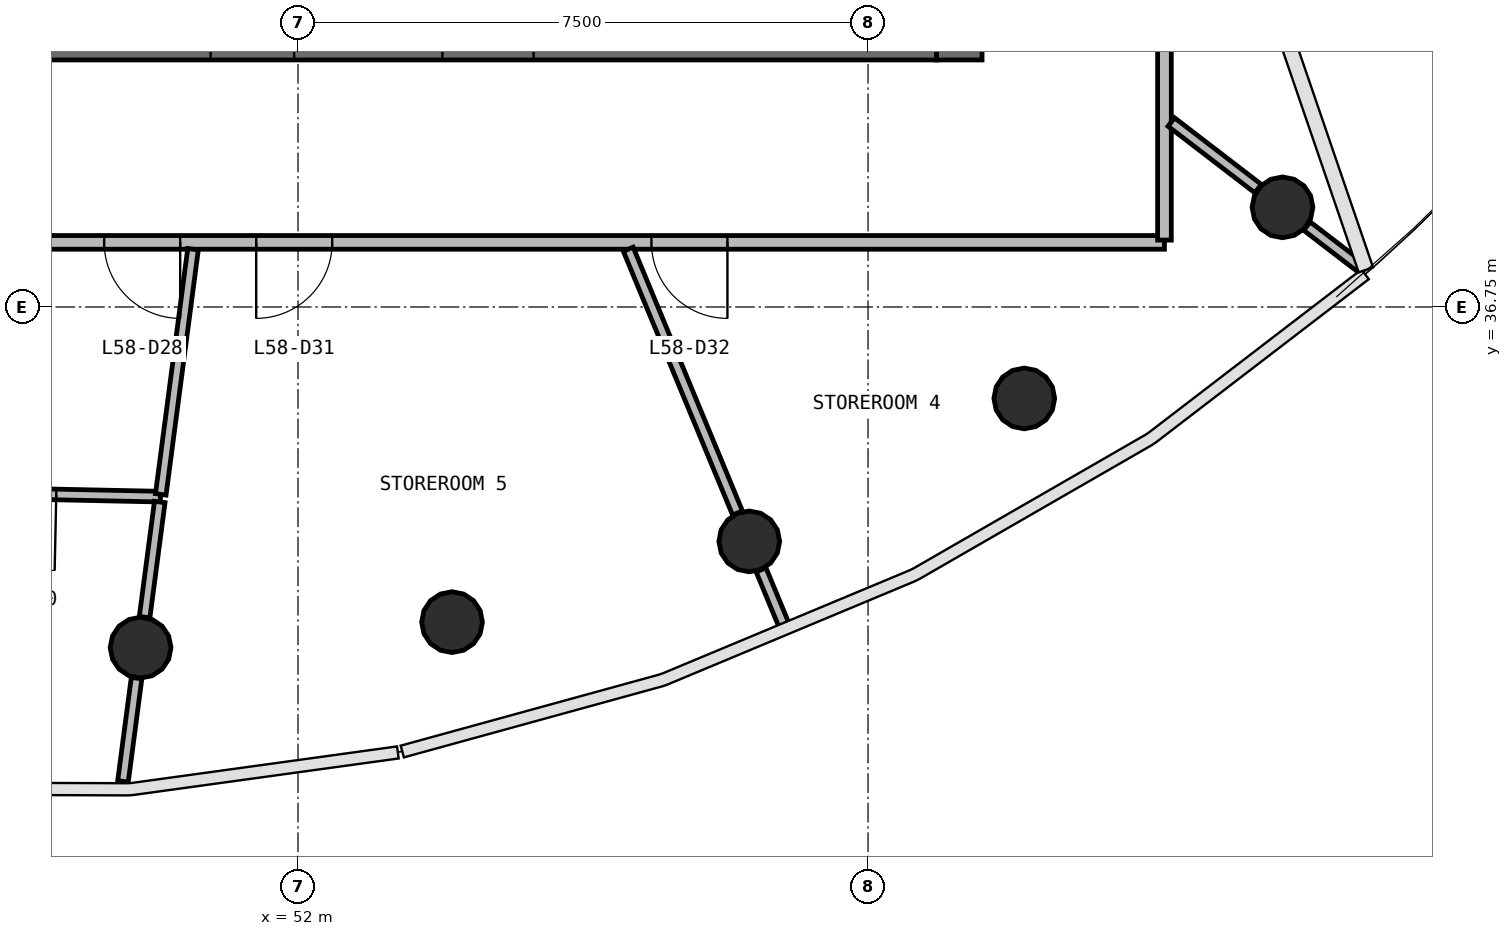
"""IFC4 building model, lengths in metres.
Left out: names, types, materials, properties, quantities, classifications, styles, units other than length and angle.
Written with IfcOpenShell. Run it as: python <this file> out.ifc"""

import sys

from ifc_helpers import new_model, si_unit, direction, frame, frame_2d, origin, origin_2d, place, context, subcontext, project, spatial, rectangle, circle, extrude, source, transform, mapped, element, fill, save


model = new_model("IFC4")
c1 = context("Model", 3, precision=1e-05, world=origin(), true_north=direction((0.0, 1.0)))
c2 = subcontext(c1, "Body", "Model", "MODEL_VIEW")
j1 = project(units=[si_unit("LENGTHUNIT", "METRE"), si_unit("PLANEANGLEUNIT", "RADIAN")], contexts=[c1])
p1 = place(None, origin())
s1 = spatial("IfcSite", under=j1, at=p1, CompositionType="ELEMENT")
p2 = place(p1, origin())
s2 = spatial("IfcBuilding", under=s1, at=p2, CompositionType="ELEMENT")
p3 = place(p2, frame((0.0, 0.0, 238.4)))
s3 = spatial("IfcBuildingStorey", under=s2, at=p3, CompositionType="ELEMENT", Elevation=238.4)
p4 = place(p3, frame((60.7, 40.0, 0.0), z_axis=(0.0, 0.0, 1.0), x_axis=(0.0, 1.0, 0.0)))
e1 = element("IfcWall", 1, at=p4, inside=s3, PredefinedType="SHEAR", context=c2, shape_type="SweptSolid", body=[
    extrude(rectangle(XDim=16.0, YDim=0.6, at=frame_2d((8.0, 0.0))), origin(), (0.0, 0.0, 1.0), 3.9),
])
p5 = place(p4, frame((7.1, 0.0, 0.0)))
e2 = element("IfcOpeningElement", 2, at=p5, cuts=e1, PredefinedType="OPENING", context=c2, shape_type="SweptSolid", body=[
    extrude(rectangle(XDim=1.8, YDim=2.1, at=frame_2d((0.9, 1.05))), frame((0.0, 0.31, 0.0), z_axis=(0.0, -1.0, 0.0), x_axis=(1.0, 0.0, 0.0)), (0.0, 0.0, 1.0), 0.62),
])
p6 = place(p3, frame((43.6, 40.3, 0.0), z_axis=(0.0, 0.0, 1.0), x_axis=(1.0, 0.0, 0.0)))
e3 = element("IfcWall", 3, at=p6, inside=s3, PredefinedType="SHEAR", context=c2, shape_type="SweptSolid", body=[
    extrude(rectangle(XDim=16.8, YDim=0.6, at=frame_2d((8.4, 0.0))), origin(), (0.0, 0.0, 1.0), 3.9),
])
p7 = place(p6, frame((10.3, 0.0, 0.0)))
e4 = element("IfcOpeningElement", 4, at=p7, cuts=e3, PredefinedType="OPENING", context=c2, shape_type="SweptSolid", body=[
    extrude(rectangle(XDim=1.2, YDim=2.1, at=frame_2d((0.6, 1.05))), frame((0.0, 0.31, 0.0), z_axis=(0.0, -1.0, 0.0), x_axis=(1.0, 0.0, 0.0)), (0.0, 0.0, 1.0), 0.62),
])
p8 = place(p6, frame((7.25, 0.0, 0.0)))
e5 = element("IfcOpeningElement", 5, at=p8, cuts=e3, PredefinedType="OPENING", context=c2, shape_type="SweptSolid", body=[
    extrude(rectangle(XDim=1.1, YDim=2.1, at=frame_2d((0.55, 1.05))), frame((0.0, 0.31, 0.0), z_axis=(0.0, -1.0, 0.0), x_axis=(1.0, 0.0, 0.0)), (0.0, 0.0, 1.0), 0.62),
])
p9 = place(p6, frame((0.7, 0.0, 0.0)))
e6 = element("IfcOpeningElement", 6, at=p9, cuts=e3, PredefinedType="OPENING", context=c2, shape_type="SweptSolid", body=[
    extrude(rectangle(XDim=0.8, YDim=2.1, at=frame_2d((0.4, 1.05))), frame((0.0, 0.31, 0.0), z_axis=(0.0, -1.0, 0.0), x_axis=(1.0, 0.0, 0.0)), (0.0, 0.0, 1.0), 0.62),
])
m1 = source(origin(), c2, "Body", "SweptSolid", [
    extrude(circle(Radius=0.4, at=origin_2d()), origin(), (0.0, 0.0, 1.0), 3.9),
])
for number, where, z_axis, x_axis in (
    (7, (49.929, 32.269, 0.0), (0.0, 0.0, 1.0), (1.0, 0.0, 0.0)),
    (8, (54.027, 32.604, 0.0), (0.0, 0.0, 1.0), (1.0, 0.0, 0.0)),
    (9, (57.937, 33.666, 0.0), (0.0, 0.0, 1.0), (1.0, 0.0, 0.0)),
    (10, (61.556, 35.547, 0.0), (0.0, 0.0, 1.0), (1.0, 0.0, 0.0)),
    (11, (64.953, 38.061, 0.0), (0.0, 0.0, 1.0), (1.0, 0.0, 0.0)),
):
    element("IfcColumn", number, at=place(p3, frame(where, z_axis=z_axis, x_axis=x_axis)), inside=s3, PredefinedType="COLUMN", context=c2, shape_type="MappedRepresentation", body=[
        mapped(m1, transform((0.0, 0.0, 0.0), scale=1.0)),
    ])
p10 = place(p3, frame((63.4, 37.6, 0.0), z_axis=(0.0, 0.0, 1.0), x_axis=(-1.0, 0.0, 0.0)))
e12 = element("IfcWall", 12, at=p10, inside=s3, PredefinedType="PARTITIONING", context=c2, shape_type="SweptSolid", body=[
    extrude(rectangle(XDim=22.8, YDim=0.18, at=frame_2d((11.4, 0.0))), origin(), (0.0, 0.0, 1.0), 2.88),
])
p11 = place(p10, frame((12.95, 0.0, 0.0)))
e13 = element("IfcOpeningElement", 13, at=p11, cuts=e12, PredefinedType="OPENING", context=c2, shape_type="SweptSolid", body=[
    extrude(rectangle(XDim=1.0, YDim=2.1, at=frame_2d((0.5, 1.05))), frame((0.0, 0.1, 0.0), z_axis=(0.0, -1.0, 0.0), x_axis=(1.0, 0.0, 0.0)), (0.0, 0.0, 1.0), 0.2),
])
p12 = place(p10, frame((10.95, 0.0, 0.0)))
e14 = element("IfcOpeningElement", 14, at=p12, cuts=e12, PredefinedType="OPENING", context=c2, shape_type="SweptSolid", body=[
    extrude(rectangle(XDim=1.0, YDim=2.1, at=frame_2d((0.5, 1.05))), frame((0.0, 0.1, 0.0), z_axis=(0.0, -1.0, 0.0), x_axis=(1.0, 0.0, 0.0)), (0.0, 0.0, 1.0), 0.2),
])
p13 = place(p10, frame((5.75, 0.0, 0.0)))
e15 = element("IfcOpeningElement", 15, at=p13, cuts=e12, PredefinedType="OPENING", context=c2, shape_type="SweptSolid", body=[
    extrude(rectangle(XDim=1.0, YDim=2.1, at=frame_2d((0.5, 1.05))), frame((0.0, 0.1, 0.0), z_axis=(0.0, -1.0, 0.0), x_axis=(1.0, 0.0, 0.0)), (0.0, 0.0, 1.0), 0.2),
])
p14 = place(p3, frame((63.4, 57.687, 0.0), z_axis=(0.0, 0.0, 1.0), x_axis=(0.0, -1.0, 0.0)))
e16 = element("IfcWall", 16, at=p14, inside=s3, PredefinedType="PARTITIONING", context=c2, shape_type="SweptSolid", body=[
    extrude(rectangle(XDim=20.057, YDim=0.18, at=frame_2d((10.028, 0.0))), origin(), (0.0, 0.0, 1.0), 2.88),
])
p15 = place(p14, frame((7.007, 0.0, 0.0)))
e17 = element("IfcOpeningElement", 17, at=p15, cuts=e16, PredefinedType="OPENING", context=c2, shape_type="SweptSolid", body=[
    extrude(rectangle(XDim=1.0, YDim=2.1, at=frame_2d((0.5, 1.05))), frame((0.0, 0.1, 0.0), z_axis=(0.0, -1.0, 0.0), x_axis=(1.0, 0.0, 0.0)), (0.0, 0.0, 1.0), 0.2),
])
p16 = place(p14, frame((9.607, 0.0, 0.0)))
e18 = element("IfcOpeningElement", 18, at=p16, cuts=e16, PredefinedType="OPENING", context=c2, shape_type="SweptSolid", body=[
    extrude(rectangle(XDim=1.0, YDim=2.1, at=frame_2d((0.5, 1.05))), frame((0.0, 0.1, 0.0), z_axis=(0.0, -1.0, 0.0), x_axis=(1.0, 0.0, 0.0)), (0.0, 0.0, 1.0), 0.2),
])
p17 = place(p3, frame((50.19, 34.255, 0.0), z_axis=(0.0, 0.0, 1.0), x_axis=(-0.999781752069, 0.020891343404, 0.0)))
e19 = element("IfcWall", 19, at=p17, inside=s3, PredefinedType="PARTITIONING", context=c2, shape_type="SweptSolid", body=[
    extrude(rectangle(XDim=3.821, YDim=0.14, at=frame_2d((1.911, 0.0))), origin(), (0.0, 0.0, 1.0), 2.88),
])
p18 = place(p17, frame((1.371, 0.0, 0.0)))
e20 = element("IfcOpeningElement", 20, at=p18, cuts=e19, PredefinedType="OPENING", context=c2, shape_type="SweptSolid", body=[
    extrude(rectangle(XDim=1.0, YDim=2.1, at=frame_2d((0.5, 1.05))), frame((0.0, 0.08, 0.0), z_axis=(0.0, -1.0, 0.0), x_axis=(1.0, 0.0, 0.0)), (0.0, 0.0, 1.0), 0.16),
])
p19 = place(p3, frame((56.345, 37.51, 0.0), z_axis=(0.0, 0.0, 1.0), x_axis=(0.382638866773, -0.923897990925, 0.0)))
e21 = element("IfcWall", 21, at=p19, inside=s3, PredefinedType="PARTITIONING", context=c2, shape_type="SweptSolid", body=[
    extrude(rectangle(XDim=3.756, YDim=0.14, at=frame_2d((1.878, 0.0))), origin(), (0.0, 0.0, 1.0), 2.88),
])
p20 = place(p3, frame((50.619, 37.51, 0.0), z_axis=(0.0, 0.0, 1.0), x_axis=(-0.130506927867, -0.991447397384, 0.0)))
e22 = element("IfcWall", 22, at=p20, inside=s3, PredefinedType="PARTITIONING", context=c2, shape_type="SweptSolid", body=[
    extrude(rectangle(XDim=3.253, YDim=0.14, at=frame_2d((1.626, 0.0))), origin(), (0.0, 0.0, 1.0), 2.88),
])
p21 = place(p3, frame((50.181, 34.185, 0.0), z_axis=(0.0, 0.0, 1.0), x_axis=(-0.130520633203, -0.991445593216, 0.0)))
e23 = element("IfcWall", 23, at=p21, inside=s3, PredefinedType="PARTITIONING", context=c2, shape_type="SweptSolid", body=[
    extrude(rectangle(XDim=1.528, YDim=0.14, at=frame_2d((0.764, 0.0))), origin(), (0.0, 0.0, 1.0), 2.88),
])
p22 = place(p3, frame((63.49, 39.183, 0.0), z_axis=(0.0, 0.0, 1.0), x_axis=(0.793316945216, -0.608808857059, 0.0)))
e24 = element("IfcWall", 24, at=p22, inside=s3, PredefinedType="PARTITIONING", context=c2, shape_type="SweptSolid", body=[
    extrude(rectangle(XDim=1.44, YDim=0.14, at=frame_2d((0.72, 0.0))), origin(), (0.0, 0.0, 1.0), 2.88),
])
p23 = place(p3, frame((49.876, 31.868, 0.0), z_axis=(0.0, 0.0, 1.0), x_axis=(-0.130565096745, -0.991439738719, 0.0)))
e25 = element("IfcWall", 25, at=p23, inside=s3, PredefinedType="PARTITIONING", context=c2, shape_type="SweptSolid", body=[
    extrude(rectangle(XDim=1.371, YDim=0.14, at=frame_2d((0.685, 0.0))), origin(), (0.0, 0.0, 1.0), 2.88),
])
p24 = place(p3, frame((65.274, 37.814, 0.0), z_axis=(0.0, 0.0, 1.0), x_axis=(0.793377017635, -0.608730570851, 0.0)))
e26 = element("IfcWall", 26, at=p24, inside=s3, PredefinedType="PARTITIONING", context=c2, shape_type="SweptSolid", body=[
    extrude(rectangle(XDim=0.891, YDim=0.14, at=frame_2d((0.446, 0.0))), origin(), (0.0, 0.0, 1.0), 2.88),
])
p25 = place(p3, frame((58.092, 33.292, 0.0), z_axis=(0.0, 0.0, 1.0), x_axis=(0.382736533707, -0.923857535427, 0.0)))
e27 = element("IfcWall", 27, at=p25, inside=s3, PredefinedType="PARTITIONING", context=c2, shape_type="SweptSolid", body=[
    extrude(rectangle(XDim=0.785, YDim=0.14, at=frame_2d((0.392, 0.0))), origin(), (0.0, 0.0, 1.0), 2.88),
])
m2 = source(origin(), c2, "Body", "SweptSolid", [
    extrude(rectangle(XDim=1.0, YDim=2.1, at=frame_2d((0.5, 1.05))), frame((0.0, 0.025, 0.0), z_axis=(0.0, -1.0, 0.0), x_axis=(1.0, 0.0, 0.0)), (0.0, 0.0, 1.0), 0.05),
])
p26 = place(p11, origin())
e28 = element("IfcDoor", 28, at=p26, inside=s3, OperationType="SINGLE_SWING_LEFT", PredefinedType="DOOR", context=c2, shape_type="MappedRepresentation", body=[
    mapped(m2, transform((0.0, 0.0, 0.0), scale=1.0)),
])
fill(e13, e28)
p27 = place(p18, origin())
e29 = element("IfcDoor", 29, at=p27, inside=s3, OperationType="SINGLE_SWING_LEFT", PredefinedType="DOOR", context=c2, shape_type="MappedRepresentation", body=[
    mapped(m2, transform((0.0, 0.0, 0.0), scale=1.0)),
])
fill(e20, e29)
p28 = place(p12, origin())
e30 = element("IfcDoor", 30, at=p28, inside=s3, OperationType="SINGLE_SWING_RIGHT", PredefinedType="DOOR", context=c2, shape_type="MappedRepresentation", body=[
    mapped(m2, transform((0.0, 0.0, 0.0), scale=1.0)),
])
fill(e14, e30)
p29 = place(p13, origin())
e31 = element("IfcDoor", 31, at=p29, inside=s3, OperationType="SINGLE_SWING_LEFT", PredefinedType="DOOR", context=c2, shape_type="MappedRepresentation", body=[
    mapped(m2, transform((0.0, 0.0, 0.0), scale=1.0)),
])
fill(e15, e31)
save(model, sys.argv[1])
